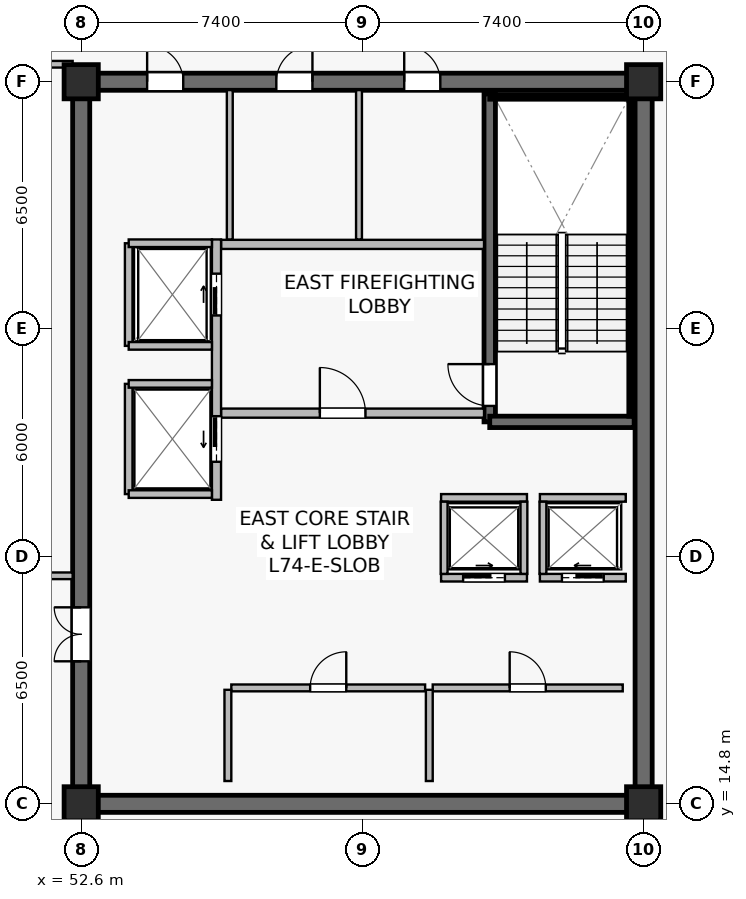
"""IFC4 building model, lengths in metres.
Left out: names, types, materials, properties, quantities, classifications, styles, units other than length and angle.
Written with IfcOpenShell. Run it as: python <this file> out.ifc"""

import sys

from ifc_helpers import new_model, si_unit, direction, frame, frame_2d, origin, origin_2d, place, context, subcontext, project, spatial, rectangle, extrude, source, transform, mapped, element, fill, save


model = new_model("IFC4")
c1 = context("Model", 3, precision=1e-05, world=origin(), true_north=direction((0.0, 1.0)))
c2 = subcontext(c1, "Body", "Model", "MODEL_VIEW")
j1 = project(units=[si_unit("LENGTHUNIT", "METRE"), si_unit("PLANEANGLEUNIT", "RADIAN")], contexts=[c1])
p1 = place(None, origin())
s1 = spatial("IfcSite", under=j1, at=p1, CompositionType="ELEMENT")
p2 = place(p1, origin())
s2 = spatial("IfcBuilding", under=s1, at=p2, CompositionType="ELEMENT")
p3 = place(p2, frame((0.0, 0.0, 310.2)))
s3 = spatial("IfcBuildingStorey", under=s2, at=p3, CompositionType="ELEMENT", Elevation=310.2)
p4 = place(p3, frame((52.375, 14.8, 0.0), z_axis=(0.0, 0.0, 1.0), x_axis=(1.0, 0.0, 0.0)))
e1 = element("IfcWall", 1, at=p4, inside=s3, PredefinedType="SHEAR", context=c2, shape_type="SweptSolid", body=[
    extrude(rectangle(XDim=15.25, YDim=0.45, at=frame_2d((7.625, 0.0))), origin(), (0.0, 0.0, 1.0), 3.9),
])
p5 = place(p3, frame((52.375, 33.8, 0.0), z_axis=(0.0, 0.0, 1.0), x_axis=(1.0, 0.0, 0.0)))
e2 = element("IfcWall", 2, at=p5, inside=s3, PredefinedType="SHEAR", context=c2, shape_type="SweptSolid", body=[
    extrude(rectangle(XDim=15.25, YDim=0.45, at=frame_2d((7.625, 0.0))), origin(), (0.0, 0.0, 1.0), 3.9),
])
p6 = place(p5, frame((8.725, 0.0, 0.0)))
e3 = element("IfcOpeningElement", 3, at=p6, cuts=e2, PredefinedType="OPENING", context=c2, shape_type="SweptSolid", body=[
    extrude(rectangle(XDim=0.95, YDim=2.15, at=frame_2d((0.475, 1.075))), frame((0.0, 0.235, 0.0), z_axis=(0.0, -1.0, 0.0), x_axis=(1.0, 0.0, 0.0)), (0.0, 0.0, 1.0), 0.47),
])
p7 = place(p5, frame((5.36, 0.0, 0.0)))
e4 = element("IfcOpeningElement", 4, at=p7, cuts=e2, PredefinedType="OPENING", context=c2, shape_type="SweptSolid", body=[
    extrude(rectangle(XDim=0.95, YDim=2.15, at=frame_2d((0.475, 1.075))), frame((0.0, 0.235, 0.0), z_axis=(0.0, -1.0, 0.0), x_axis=(1.0, 0.0, 0.0)), (0.0, 0.0, 1.0), 0.47),
])
p8 = place(p5, frame((1.96, 0.0, 0.0)))
e5 = element("IfcOpeningElement", 5, at=p8, cuts=e2, PredefinedType="OPENING", context=c2, shape_type="SweptSolid", body=[
    extrude(rectangle(XDim=0.95, YDim=2.15, at=frame_2d((0.475, 1.075))), frame((0.0, 0.235, 0.0), z_axis=(0.0, -1.0, 0.0), x_axis=(1.0, 0.0, 0.0)), (0.0, 0.0, 1.0), 0.47),
])
p9 = place(p3, frame((52.6, 15.025, 0.0), z_axis=(0.0, 0.0, 1.0), x_axis=(0.0, 1.0, 0.0)))
e6 = element("IfcWall", 6, at=p9, inside=s3, PredefinedType="SHEAR", context=c2, shape_type="SweptSolid", body=[
    extrude(rectangle(XDim=18.55, YDim=0.45, at=frame_2d((9.275, 0.0))), origin(), (0.0, 0.0, 1.0), 3.9),
])
p10 = place(p9, frame((3.525, 0.0, 0.0)))
e7 = element("IfcOpeningElement", 7, at=p10, cuts=e6, PredefinedType="OPENING", context=c2, shape_type="SweptSolid", body=[
    extrude(rectangle(XDim=1.42, YDim=2.2, at=frame_2d((0.71, 1.1))), frame((0.0, 0.235, 0.0), z_axis=(0.0, -1.0, 0.0), x_axis=(1.0, 0.0, 0.0)), (0.0, 0.0, 1.0), 0.47),
])
p11 = place(p3, frame((67.4, 15.025, 0.0), z_axis=(0.0, 0.0, 1.0), x_axis=(0.0, 1.0, 0.0)))
e8 = element("IfcWall", 8, at=p11, inside=s3, PredefinedType="SHEAR", context=c2, shape_type="SweptSolid", body=[
    extrude(rectangle(XDim=18.55, YDim=0.45, at=frame_2d((9.275, 0.0))), origin(), (0.0, 0.0, 1.0), 3.9),
])
p12 = place(p3, frame((63.35, 24.85, 0.0), z_axis=(0.0, 0.0, 1.0), x_axis=(0.0, 1.0, 0.0)))
e9 = element("IfcWall", 9, at=p12, inside=s3, PredefinedType="SHEAR", context=c2, shape_type="SweptSolid", body=[
    extrude(rectangle(XDim=8.63, YDim=0.3, at=frame_2d((4.315, 0.0))), origin(), (0.0, 0.0, 1.0), 3.9),
])
p13 = place(p12, frame((0.42, 0.0, 0.0)))
e10 = element("IfcOpeningElement", 10, at=p13, cuts=e9, PredefinedType="OPENING", context=c2, shape_type="SweptSolid", body=[
    extrude(rectangle(XDim=1.1, YDim=2.15, at=frame_2d((0.55, 1.075))), frame((0.0, 0.16, 0.0), z_axis=(0.0, -1.0, 0.0), x_axis=(1.0, 0.0, 0.0)), (0.0, 0.0, 1.0), 0.32),
])
p14 = place(p3, frame((63.35, 24.85, 0.0), z_axis=(0.0, 0.0, 1.0), x_axis=(1.0, 0.0, 0.0)))
e11 = element("IfcWall", 11, at=p14, inside=s3, PredefinedType="SHEAR", context=c2, shape_type="SweptSolid", body=[
    extrude(rectangle(XDim=3.8, YDim=0.3, at=frame_2d((1.9, 0.0))), origin(), (0.0, 0.0, 1.0), 3.9),
])
p15 = place(p3, frame((63.35, 33.4, 0.0), z_axis=(0.0, 0.0, 1.0), x_axis=(1.0, 0.0, 0.0)))
e12 = element("IfcWall", 12, at=p15, inside=s3, PredefinedType="SOLIDWALL", context=c2, shape_type="SweptSolid", body=[
    extrude(rectangle(XDim=3.72, YDim=0.12, at=frame_2d((1.86, 0.0))), origin(), (0.0, 0.0, 1.0), 3.9),
])
p16 = place(p3, frame((67.07, 25.0, 0.0), z_axis=(0.0, 0.0, 1.0), x_axis=(0.0, 1.0, 0.0)))
e13 = element("IfcWall", 13, at=p16, inside=s3, PredefinedType="SOLIDWALL", context=c2, shape_type="SweptSolid", body=[
    extrude(rectangle(XDim=8.32, YDim=0.12, at=frame_2d((4.16, 0.0))), origin(), (0.0, 0.0, 1.0), 3.9),
])
m1 = source(origin(), c2, "Body", "SweptSolid", [
    extrude(rectangle(XDim=0.9, YDim=0.9, at=origin_2d()), origin(), (0.0, 0.0, 1.0), 4.2),
])
for number, where, z_axis, x_axis in (
    (14, (52.6, 14.8, 0.0), (0.0, 0.0, 1.0), (1.0, 0.0, 0.0)),
    (15, (67.4, 14.8, 0.0), (0.0, 0.0, 1.0), (1.0, 0.0, 0.0)),
    (16, (52.6, 33.8, 0.0), (0.0, 0.0, 1.0), (1.0, 0.0, 0.0)),
    (17, (67.4, 33.8, 0.0), (0.0, 0.0, 1.0), (1.0, 0.0, 0.0)),
):
    element("IfcColumn", number, at=place(p3, frame(where, z_axis=z_axis, x_axis=x_axis)), inside=s3, PredefinedType="COLUMN", context=c2, shape_type="MappedRepresentation", body=[
        mapped(m1, transform((0.0, 0.0, 0.0), scale=1.0)),
    ])
p17 = place(p3, frame((56.28, 25.08, 0.0), z_axis=(0.0, 0.0, 1.0), x_axis=(1.0, 0.0, 0.0)))
e18 = element("IfcWall", 18, at=p17, inside=s3, PredefinedType="SOLIDWALL", context=c2, shape_type="SweptSolid", body=[
    extrude(rectangle(XDim=6.92, YDim=0.24, at=frame_2d((3.46, 0.0))), origin(), (0.0, 0.0, 1.0), 3.297),
])
p18 = place(p17, frame((2.6, 0.0, 0.0)))
e19 = element("IfcOpeningElement", 19, at=p18, cuts=e18, PredefinedType="OPENING", context=c2, shape_type="SweptSolid", body=[
    extrude(rectangle(XDim=1.2, YDim=2.16, at=frame_2d((0.6, 1.08))), frame((0.0, 0.13, 0.0), z_axis=(0.0, -1.0, 0.0), x_axis=(1.0, 0.0, 0.0)), (0.0, 0.0, 1.0), 0.26),
])
p19 = place(p3, frame((56.28, 29.52, 0.0), z_axis=(0.0, 0.0, 1.0), x_axis=(1.0, 0.0, 0.0)))
e20 = element("IfcWall", 20, at=p19, inside=s3, PredefinedType="SOLIDWALL", context=c2, shape_type="SweptSolid", body=[
    extrude(rectangle(XDim=6.92, YDim=0.24, at=frame_2d((3.46, 0.0))), origin(), (0.0, 0.0, 1.0), 3.297),
])
p20 = place(p3, frame((56.16, 22.8, 0.0), z_axis=(0.0, 0.0, 1.0), x_axis=(0.0, 1.0, 0.0)))
e21 = element("IfcWall", 21, at=p20, inside=s3, PredefinedType="SOLIDWALL", context=c2, shape_type="SweptSolid", body=[
    extrude(rectangle(XDim=6.85, YDim=0.24, at=frame_2d((3.425, 0.0))), origin(), (0.0, 0.0, 1.0), 3.035),
])
p21 = place(p20, frame((4.85, 0.0, 0.0)))
e22 = element("IfcOpeningElement", 22, at=p21, cuts=e21, PredefinedType="OPENING", context=c2, shape_type="SweptSolid", body=[
    extrude(rectangle(XDim=1.1, YDim=2.22, at=frame_2d((0.55, 1.11))), frame((0.0, 0.13, 0.0), z_axis=(0.0, -1.0, 0.0), x_axis=(1.0, 0.0, 0.0)), (0.0, 0.0, 1.0), 0.26),
])
p22 = place(p20, frame((1.0, 0.0, 0.0)))
e23 = element("IfcOpeningElement", 23, at=p22, cuts=e21, PredefinedType="OPENING", context=c2, shape_type="SweptSolid", body=[
    extrude(rectangle(XDim=1.2, YDim=2.22, at=frame_2d((0.6, 1.11))), frame((0.0, 0.13, 0.0), z_axis=(0.0, -1.0, 0.0), x_axis=(1.0, 0.0, 0.0)), (0.0, 0.0, 1.0), 0.26),
])
p23 = place(p3, frame((64.67, 20.75, 0.0), z_axis=(0.0, 0.0, 1.0), x_axis=(1.0, 0.0, 0.0)))
e24 = element("IfcWall", 24, at=p23, inside=s3, PredefinedType="SOLIDWALL", context=c2, shape_type="SweptSolid", body=[
    extrude(rectangle(XDim=2.26, YDim=0.2, at=frame_2d((1.13, 0.0))), origin(), (0.0, 0.0, 1.0), 3.9),
])
p24 = place(p23, frame((0.58, 0.0, 0.0)))
e25 = element("IfcOpeningElement", 25, at=p24, cuts=e24, PredefinedType="OPENING", context=c2, shape_type="SweptSolid", body=[
    extrude(rectangle(XDim=1.1, YDim=2.22, at=frame_2d((0.55, 1.11))), frame((0.0, 0.11, 0.0), z_axis=(0.0, -1.0, 0.0), x_axis=(1.0, 0.0, 0.0)), (0.0, 0.0, 1.0), 0.22),
])
p25 = place(p3, frame((64.67, 22.85, 0.0), z_axis=(0.0, 0.0, 1.0), x_axis=(1.0, 0.0, 0.0)))
e26 = element("IfcWall", 26, at=p25, inside=s3, PredefinedType="SOLIDWALL", context=c2, shape_type="SweptSolid", body=[
    extrude(rectangle(XDim=2.26, YDim=0.2, at=frame_2d((1.13, 0.0))), origin(), (0.0, 0.0, 1.0), 3.9),
])
p26 = place(p3, frame((64.75, 20.85, 0.0), z_axis=(0.0, 0.0, 1.0), x_axis=(0.0, 1.0, 0.0)))
e27 = element("IfcWall", 27, at=p26, inside=s3, PredefinedType="SOLIDWALL", context=c2, shape_type="SweptSolid", body=[
    extrude(rectangle(XDim=1.9, YDim=0.18, at=frame_2d((0.95, 0.0))), origin(), (0.0, 0.0, 1.0), 3.9),
])
p27 = place(p3, frame((62.07, 20.75, 0.0), z_axis=(0.0, 0.0, 1.0), x_axis=(1.0, 0.0, 0.0)))
e28 = element("IfcWall", 28, at=p27, inside=s3, PredefinedType="SOLIDWALL", context=c2, shape_type="SweptSolid", body=[
    extrude(rectangle(XDim=2.26, YDim=0.2, at=frame_2d((1.13, 0.0))), origin(), (0.0, 0.0, 1.0), 3.9),
])
p28 = place(p27, frame((0.58, 0.0, 0.0)))
e29 = element("IfcOpeningElement", 29, at=p28, cuts=e28, PredefinedType="OPENING", context=c2, shape_type="SweptSolid", body=[
    extrude(rectangle(XDim=1.1, YDim=2.22, at=frame_2d((0.55, 1.11))), frame((0.0, 0.11, 0.0), z_axis=(0.0, -1.0, 0.0), x_axis=(1.0, 0.0, 0.0)), (0.0, 0.0, 1.0), 0.22),
])
p29 = place(p3, frame((62.07, 22.85, 0.0), z_axis=(0.0, 0.0, 1.0), x_axis=(1.0, 0.0, 0.0)))
e30 = element("IfcWall", 30, at=p29, inside=s3, PredefinedType="SOLIDWALL", context=c2, shape_type="SweptSolid", body=[
    extrude(rectangle(XDim=2.26, YDim=0.2, at=frame_2d((1.13, 0.0))), origin(), (0.0, 0.0, 1.0), 3.9),
])
for number, where, z_axis, x_axis in (
    (31, (62.15, 20.85, 0.0), (0.0, 0.0, 1.0), (0.0, 1.0, 0.0)),
    (32, (64.25, 20.85, 0.0), (0.0, 0.0, 1.0), (0.0, 1.0, 0.0)),
):
    element("IfcWall", number, at=place(p3, frame(where, z_axis=z_axis, x_axis=x_axis)), inside=s3, PredefinedType="SOLIDWALL", context=c2, shape_type="SweptSolid", body=[
        extrude(rectangle(XDim=1.9, YDim=0.18, at=frame_2d((0.95, 0.0))), origin(), (0.0, 0.0, 1.0), 3.9),
    ])
p30 = place(p3, frame((53.85, 26.85, 0.0), z_axis=(0.0, 0.0, 1.0), x_axis=(0.0, 1.0, 0.0)))
e33 = element("IfcWall", 33, at=p30, inside=s3, PredefinedType="SOLIDWALL", context=c2, shape_type="SweptSolid", body=[
    extrude(rectangle(XDim=2.7, YDim=0.2, at=frame_2d((1.35, 0.0))), origin(), (0.0, 0.0, 1.0), 3.9),
])
p31 = place(p3, frame((53.85, 29.55, 0.0), z_axis=(0.0, 0.0, 1.0), x_axis=(1.0, 0.0, 0.0)))
e34 = element("IfcWall", 34, at=p31, inside=s3, PredefinedType="SOLIDWALL", context=c2, shape_type="SweptSolid", body=[
    extrude(rectangle(XDim=2.19, YDim=0.2, at=frame_2d((1.095, 0.0))), origin(), (0.0, 0.0, 1.0), 3.9),
])
p32 = place(p3, frame((53.85, 26.85, 0.0), z_axis=(0.0, 0.0, 1.0), x_axis=(1.0, 0.0, 0.0)))
e35 = element("IfcWall", 35, at=p32, inside=s3, PredefinedType="SOLIDWALL", context=c2, shape_type="SweptSolid", body=[
    extrude(rectangle(XDim=2.19, YDim=0.2, at=frame_2d((1.095, 0.0))), origin(), (0.0, 0.0, 1.0), 3.297),
])
p33 = place(p3, frame((53.85, 22.95, 0.0), z_axis=(0.0, 0.0, 1.0), x_axis=(0.0, 1.0, 0.0)))
e36 = element("IfcWall", 36, at=p33, inside=s3, PredefinedType="SOLIDWALL", context=c2, shape_type="SweptSolid", body=[
    extrude(rectangle(XDim=2.9, YDim=0.2, at=frame_2d((1.45, 0.0))), origin(), (0.0, 0.0, 1.0), 3.035),
])
for number, where, z_axis, x_axis in (
    (37, (53.85, 25.85, 0.0), (0.0, 0.0, 1.0), (1.0, 0.0, 0.0)),
    (38, (53.85, 22.95, 0.0), (0.0, 0.0, 1.0), (1.0, 0.0, 0.0)),
):
    element("IfcWall", number, at=place(p3, frame(where, z_axis=z_axis, x_axis=x_axis)), inside=s3, PredefinedType="SOLIDWALL", context=c2, shape_type="SweptSolid", body=[
        extrude(rectangle(XDim=2.19, YDim=0.2, at=frame_2d((1.095, 0.0))), origin(), (0.0, 0.0, 1.0), 3.9),
    ])
p34 = place(p3, frame((61.85, 17.85, 0.0), z_axis=(0.0, 0.0, 1.0), x_axis=(1.0, 0.0, 0.0)))
e39 = element("IfcWall", 39, at=p34, inside=s3, PredefinedType="SOLIDWALL", context=c2, shape_type="SweptSolid", body=[
    extrude(rectangle(XDim=5.0, YDim=0.18, at=frame_2d((2.5, 0.0))), origin(), (0.0, 0.0, 1.0), 3.9),
])
p35 = place(p34, frame((2.025, 0.0, 0.0)))
e40 = element("IfcOpeningElement", 40, at=p35, cuts=e39, PredefinedType="OPENING", context=c2, shape_type="SweptSolid", body=[
    extrude(rectangle(XDim=0.95, YDim=2.15, at=frame_2d((0.475, 1.075))), frame((0.0, 0.1, 0.0), z_axis=(0.0, -1.0, 0.0), x_axis=(1.0, 0.0, 0.0)), (0.0, 0.0, 1.0), 0.2),
])
p36 = place(p3, frame((61.76, 15.4, 0.0), z_axis=(0.0, 0.0, 1.0), x_axis=(0.0, 1.0, 0.0)))
e41 = element("IfcWall", 41, at=p36, inside=s3, PredefinedType="SOLIDWALL", context=c2, shape_type="SweptSolid", body=[
    extrude(rectangle(XDim=2.4, YDim=0.18, at=frame_2d((1.2, 0.0))), origin(), (0.0, 0.0, 1.0), 3.9),
])
p37 = place(p3, frame((56.55, 17.85, 0.0), z_axis=(0.0, 0.0, 1.0), x_axis=(1.0, 0.0, 0.0)))
e42 = element("IfcWall", 42, at=p37, inside=s3, PredefinedType="SOLIDWALL", context=c2, shape_type="SweptSolid", body=[
    extrude(rectangle(XDim=5.1, YDim=0.18, at=frame_2d((2.55, 0.0))), origin(), (0.0, 0.0, 1.0), 3.297),
])
p38 = place(p37, frame((2.075, 0.0, 0.0)))
e43 = element("IfcOpeningElement", 43, at=p38, cuts=e42, PredefinedType="OPENING", context=c2, shape_type="SweptSolid", body=[
    extrude(rectangle(XDim=0.95, YDim=2.15, at=frame_2d((0.475, 1.075))), frame((0.0, 0.1, 0.0), z_axis=(0.0, -1.0, 0.0), x_axis=(1.0, 0.0, 0.0)), (0.0, 0.0, 1.0), 0.2),
])
p39 = place(p3, frame((56.46, 15.4, 0.0), z_axis=(0.0, 0.0, 1.0), x_axis=(0.0, 1.0, 0.0)))
e44 = element("IfcWall", 44, at=p39, inside=s3, PredefinedType="SOLIDWALL", context=c2, shape_type="SweptSolid", body=[
    extrude(rectangle(XDim=2.4, YDim=0.18, at=frame_2d((1.2, 0.0))), origin(), (0.0, 0.0, 1.0), 3.9),
])
p40 = place(p3, frame((59.91, 29.65, 0.0), z_axis=(0.0, 0.0, 1.0), x_axis=(0.0, 1.0, 0.0)))
e45 = element("IfcWall", 45, at=p40, inside=s3, PredefinedType="PLUMBINGWALL", context=c2, shape_type="SweptSolid", body=[
    extrude(rectangle(XDim=3.93, YDim=0.155, at=frame_2d((1.965, 0.0))), origin(), (0.0, 0.0, 1.0), 3.297),
])
p41 = place(p3, frame((56.51, 29.65, 0.0), z_axis=(0.0, 0.0, 1.0), x_axis=(0.0, 1.0, 0.0)))
e46 = element("IfcWall", 46, at=p41, inside=s3, PredefinedType="PLUMBINGWALL", context=c2, shape_type="SweptSolid", body=[
    extrude(rectangle(XDim=3.93, YDim=0.155, at=frame_2d((1.965, 0.0))), origin(), (0.0, 0.0, 1.0), 3.9),
])
p42 = place(p3, frame((48.3, 34.26, 0.0), z_axis=(0.0, 0.0, 1.0), x_axis=(1.0, 0.0, 0.0)))
e47 = element("IfcWall", 47, at=p42, inside=s3, PredefinedType="PARTITIONING", context=c2, shape_type="SweptSolid", body=[
    extrude(rectangle(XDim=4.075, YDim=0.175, at=frame_2d((2.038, 0.0))), origin(), (0.0, 0.0, 1.0), 3.635),
])
p43 = place(p3, frame((48.3, 20.8, 0.0), z_axis=(0.0, 0.0, 1.0), x_axis=(1.0, 0.0, 0.0)))
e48 = element("IfcWall", 48, at=p43, inside=s3, PredefinedType="PARTITIONING", context=c2, shape_type="SweptSolid", body=[
    extrude(rectangle(XDim=4.075, YDim=0.175, at=frame_2d((2.038, 0.0))), origin(), (0.0, 0.0, 1.0), 3.9),
])
p44 = place(p43, frame((1.35, 0.0, 0.0)))
e49 = element("IfcOpeningElement", 49, at=p44, cuts=e48, PredefinedType="OPENING", context=c2, shape_type="SweptSolid", body=[
    extrude(rectangle(XDim=0.95, YDim=2.15, at=frame_2d((0.475, 1.075))), frame((0.0, 0.098, 0.0), z_axis=(0.0, -1.0, 0.0), x_axis=(1.0, 0.0, 0.0)), (0.0, 0.0, 1.0), 0.195),
])
m2 = source(origin(), c2, "Body", "SweptSolid", [
    extrude(rectangle(XDim=1.1, YDim=2.15, at=frame_2d((0.55, 1.075))), frame((0.0, 0.025, 0.0), z_axis=(0.0, -1.0, 0.0), x_axis=(1.0, 0.0, 0.0)), (0.0, 0.0, 1.0), 0.05),
])
p45 = place(p13, origin())
e50 = element("IfcDoor", 50, at=p45, inside=s3, OperationType="SINGLE_SWING_RIGHT", PredefinedType="DOOR", context=c2, shape_type="MappedRepresentation", body=[
    mapped(m2, transform((0.0, 0.0, 0.0), scale=1.0)),
])
fill(e10, e50)
m3 = source(origin(), c2, "Body", "SweptSolid", [
    extrude(rectangle(XDim=1.2, YDim=2.16, at=frame_2d((0.6, 1.08))), frame((0.0, 0.025, 0.0), z_axis=(0.0, -1.0, 0.0), x_axis=(1.0, 0.0, 0.0)), (0.0, 0.0, 1.0), 0.05),
])
p46 = place(p18, origin())
e51 = element("IfcDoor", 51, at=p46, inside=s3, OperationType="SINGLE_SWING_LEFT", PredefinedType="DOOR", context=c2, shape_type="MappedRepresentation", body=[
    mapped(m3, transform((0.0, 0.0, 0.0), scale=1.0)),
])
fill(e19, e51)
m4 = source(origin(), c2, "Body", "SweptSolid", [
    extrude(rectangle(XDim=1.1, YDim=2.22, at=frame_2d((0.55, 1.11))), frame((0.0, 0.025, 0.0), z_axis=(0.0, -1.0, 0.0), x_axis=(1.0, 0.0, 0.0)), (0.0, 0.0, 1.0), 0.05),
])
p47 = place(p24, origin())
e52 = element("IfcDoor", 52, at=p47, inside=s3, OperationType="SLIDING_TO_LEFT", PredefinedType="USERDEFINED", context=c2, shape_type="MappedRepresentation", body=[
    mapped(m4, transform((0.0, 0.0, 0.0), scale=1.0)),
])
fill(e25, e52)
p48 = place(p28, origin())
e53 = element("IfcDoor", 53, at=p48, inside=s3, OperationType="SLIDING_TO_RIGHT", PredefinedType="USERDEFINED", context=c2, shape_type="MappedRepresentation", body=[
    mapped(m4, transform((0.0, 0.0, 0.0), scale=1.0)),
])
fill(e29, e53)
p49 = place(p21, origin())
e54 = element("IfcDoor", 54, at=p49, inside=s3, OperationType="SLIDING_TO_RIGHT", PredefinedType="USERDEFINED", context=c2, shape_type="MappedRepresentation", body=[
    mapped(m4, transform((0.0, 0.0, 0.0), scale=1.0)),
])
fill(e22, e54)
m5 = source(origin(), c2, "Body", "SweptSolid", [
    extrude(rectangle(XDim=1.2, YDim=2.22, at=frame_2d((0.6, 1.11))), frame((0.0, 0.025, 0.0), z_axis=(0.0, -1.0, 0.0), x_axis=(1.0, 0.0, 0.0)), (0.0, 0.0, 1.0), 0.05),
])
p50 = place(p22, origin())
e55 = element("IfcDoor", 55, at=p50, inside=s3, OperationType="SLIDING_TO_LEFT", PredefinedType="USERDEFINED", context=c2, shape_type="MappedRepresentation", body=[
    mapped(m5, transform((0.0, 0.0, 0.0), scale=1.0)),
])
fill(e23, e55)
m6 = source(origin(), c2, "Body", "SweptSolid", [
    extrude(rectangle(XDim=0.95, YDim=2.15, at=frame_2d((0.475, 1.075))), frame((0.0, 0.025, 0.0), z_axis=(0.0, -1.0, 0.0), x_axis=(1.0, 0.0, 0.0)), (0.0, 0.0, 1.0), 0.05),
])
p51 = place(p35, origin())
e56 = element("IfcDoor", 56, at=p51, inside=s3, OperationType="SINGLE_SWING_LEFT", PredefinedType="DOOR", context=c2, shape_type="MappedRepresentation", body=[
    mapped(m6, transform((0.0, 0.0, 0.0), scale=1.0)),
])
fill(e40, e56)
p52 = place(p38, origin())
e57 = element("IfcDoor", 57, at=p52, inside=s3, OperationType="SINGLE_SWING_RIGHT", PredefinedType="DOOR", context=c2, shape_type="MappedRepresentation", body=[
    mapped(m6, transform((0.0, 0.0, 0.0), scale=1.0)),
])
fill(e43, e57)
m7 = source(origin(), c2, "Body", "SweptSolid", [
    extrude(rectangle(XDim=1.42, YDim=2.2, at=frame_2d((0.71, 1.1))), frame((0.0, 0.025, 0.0), z_axis=(0.0, -1.0, 0.0), x_axis=(1.0, 0.0, 0.0)), (0.0, 0.0, 1.0), 0.05),
])
p53 = place(p10, origin())
e58 = element("IfcDoor", 58, at=p53, inside=s3, OperationType="DOUBLE_DOOR_SINGLE_SWING", PredefinedType="DOOR", context=c2, shape_type="MappedRepresentation", body=[
    mapped(m7, transform((0.0, 0.0, 0.0), scale=1.0)),
])
fill(e7, e58)
p54 = place(p6, origin())
e59 = element("IfcDoor", 59, at=p54, inside=s3, OperationType="SINGLE_SWING_LEFT", PredefinedType="DOOR", context=c2, shape_type="MappedRepresentation", body=[
    mapped(m6, transform((0.0, 0.0, 0.0), scale=1.0)),
])
fill(e3, e59)
p55 = place(p7, origin())
e60 = element("IfcDoor", 60, at=p55, inside=s3, OperationType="SINGLE_SWING_RIGHT", PredefinedType="DOOR", context=c2, shape_type="MappedRepresentation", body=[
    mapped(m6, transform((0.0, 0.0, 0.0), scale=1.0)),
])
fill(e4, e60)
p56 = place(p8, origin())
e61 = element("IfcDoor", 61, at=p56, inside=s3, OperationType="SINGLE_SWING_LEFT", PredefinedType="DOOR", context=c2, shape_type="MappedRepresentation", body=[
    mapped(m6, transform((0.0, 0.0, 0.0), scale=1.0)),
])
fill(e5, e61)
save(model, sys.argv[1])
